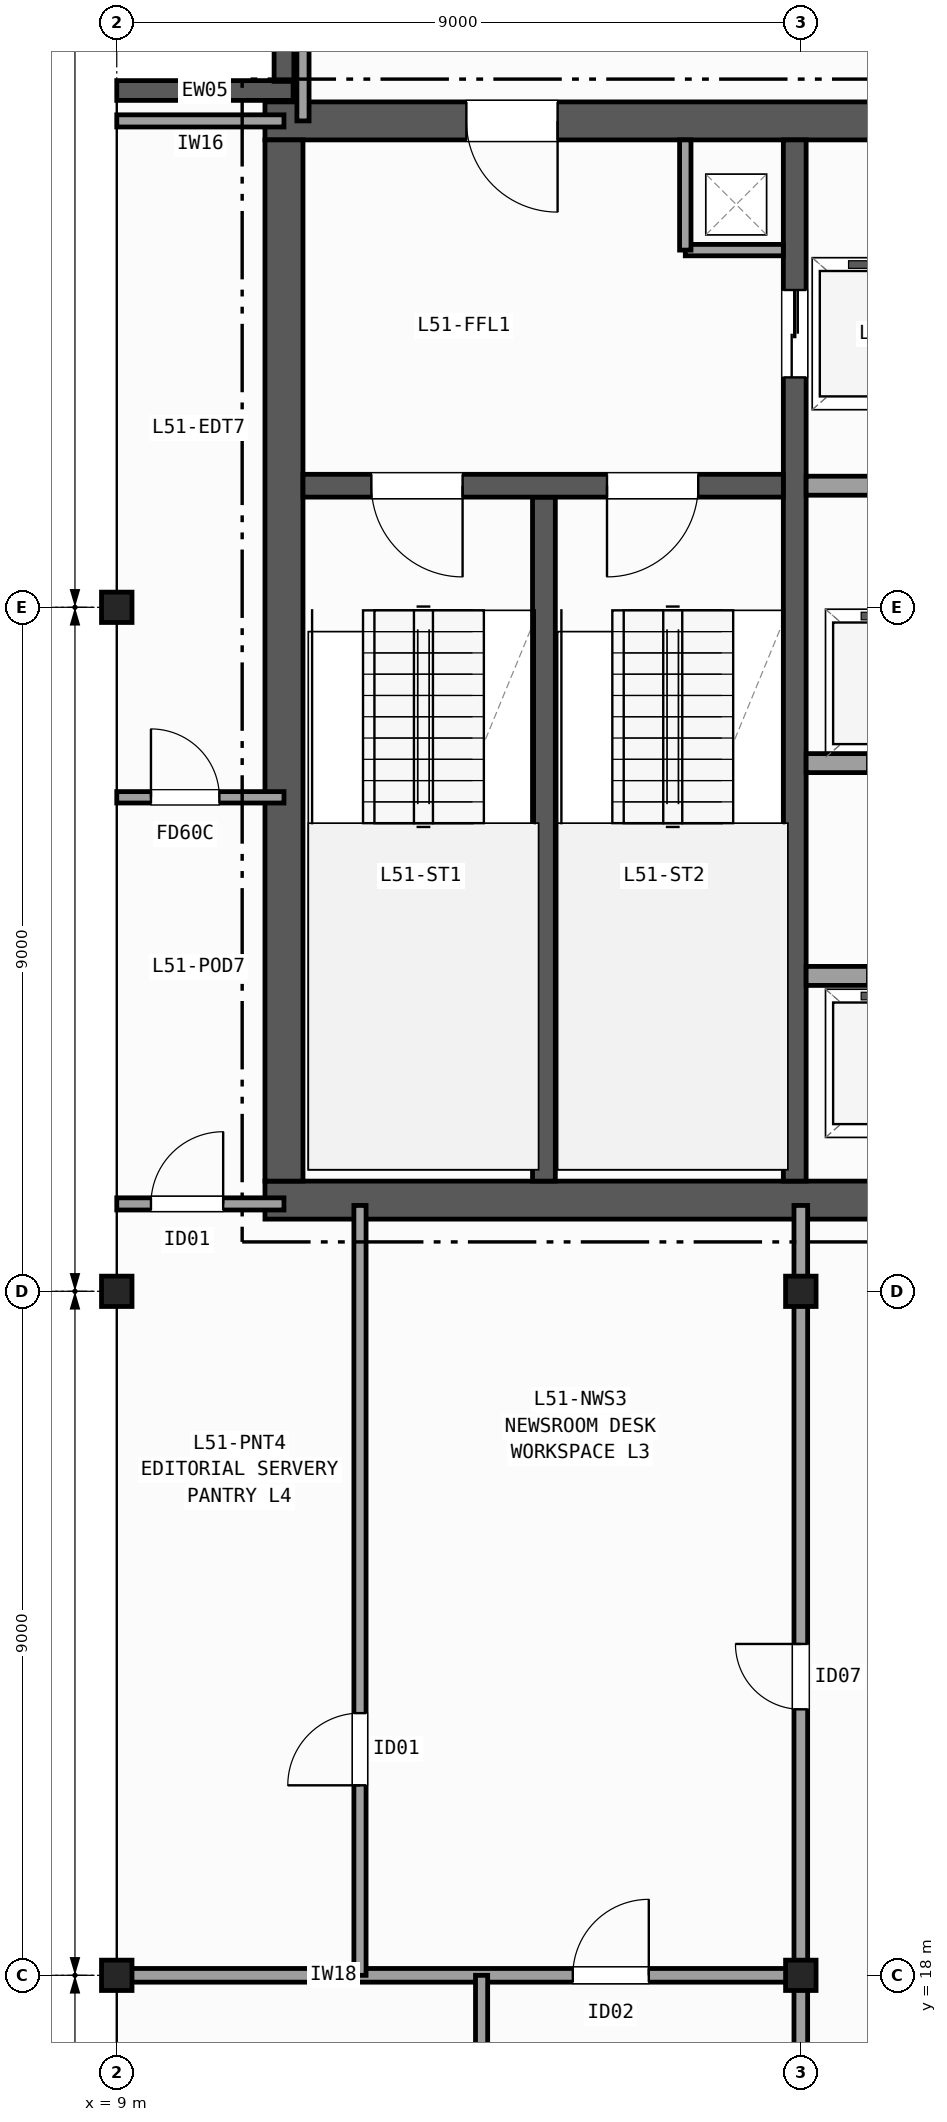
"""IFC4 building model, lengths in metres.
Left out: names, types, materials, properties, quantities, classifications, styles, units other than length and angle.
Written with IfcOpenShell. Run it as: python <this file> out.ifc"""

import sys

from ifc_helpers import new_model, si_unit, direction, frame, frame_2d, origin, origin_2d, place, context, subcontext, project, spatial, rectangle, i_section, extrude, element, fill, save


model = new_model("IFC4")
c1 = context("Model", 3, precision=1e-05, world=origin(), true_north=direction((0.0, 1.0)))
c2 = subcontext(c1, "Body", "Model", "MODEL_VIEW")
j1 = project(units=[si_unit("LENGTHUNIT", "METRE"), si_unit("PLANEANGLEUNIT", "RADIAN")], contexts=[c1])
p1 = place(None, origin())
s1 = spatial("IfcSite", under=j1, at=p1, CompositionType="ELEMENT")
p2 = place(p1, origin())
s2 = spatial("IfcBuilding", under=s1, at=p2, CompositionType="ELEMENT")
p3 = place(p2, frame((0.0, 0.0, 206.2)))
s3 = spatial("IfcBuildingStorey", under=s2, at=p3, CompositionType="ELEMENT", Elevation=206.2)
for number, where, z_axis, x_axis in (
    (1, (9.0, 18.0, 0.0), (0.0, 0.0, 1.0), (1.0, 0.0, 0.0)),
    (2, (9.0, 27.0, 0.0), (0.0, 0.0, 1.0), (1.0, 0.0, 0.0)),
    (3, (9.0, 36.0, 0.0), (0.0, 0.0, 1.0), (1.0, 0.0, 0.0)),
    (4, (18.0, 18.0, 0.0), (0.0, 0.0, 1.0), (1.0, 0.0, 0.0)),
    (5, (18.0, 27.0, 0.0), (0.0, 0.0, 1.0), (1.0, 0.0, 0.0)),
):
    element("IfcColumn", number, at=place(p3, frame(where, z_axis=z_axis, x_axis=x_axis)), inside=s3, PredefinedType="COLUMN", context=c2, shape_type="SweptSolid", body=[
        extrude(i_section(OverallWidth=0.401, OverallDepth=0.399, WebThickness=0.025, FlangeThickness=0.04, FilletRadius=0.015, at=origin_2d()), origin(), (0.0, 0.0, 1.0), 3.7),
    ])
p4 = place(p3, frame((9.0, 42.8, 0.0), z_axis=(0.0, 0.0, 1.0), x_axis=(1.0, 0.0, 0.0)))
e6 = element("IfcWall", 6, at=p4, inside=s3, PredefinedType="SOLIDWALL", context=c2, shape_type="SweptSolid", body=[
    extrude(rectangle(XDim=2.32, YDim=0.26, at=frame_2d((1.16, 0.0))), origin(), (0.0, 0.0, 1.0), 3.42),
])
p5 = place(p3, frame((11.2, 42.92, 0.0), z_axis=(0.0, 0.0, 1.0), x_axis=(0.0, 1.0, 0.0)))
e7 = element("IfcWall", 7, at=p5, inside=s3, PredefinedType="SOLIDWALL", context=c2, shape_type="SweptSolid", body=[
    extrude(rectangle(XDim=2.08, YDim=0.26, at=frame_2d((1.04, 0.0))), origin(), (0.0, 0.0, 1.0), 3.42),
])
p6 = place(p3, frame((10.95, 28.2, 0.0), z_axis=(0.0, 0.0, 1.0), x_axis=(1.0, 0.0, 0.0)))
e8 = element("IfcWall", 8, at=p6, inside=s3, PredefinedType="SHEAR", context=c2, shape_type="SweptSolid", body=[
    extrude(rectangle(XDim=13.9, YDim=0.5, at=frame_2d((6.95, 0.0))), origin(), (0.0, 0.0, 1.0), 3.42),
])
p7 = place(p3, frame((24.85, 42.4, 0.0), z_axis=(0.0, 0.0, 1.0), x_axis=(-1.0, 0.0, 0.0)))
e9 = element("IfcWall", 9, at=p7, inside=s3, PredefinedType="SHEAR", context=c2, shape_type="SweptSolid", body=[
    extrude(rectangle(XDim=13.9, YDim=0.5, at=frame_2d((6.95, 0.0))), origin(), (0.0, 0.0, 1.0), 3.42),
])
p8 = place(p7, frame((10.05, 0.0, 0.0)))
e10 = element("IfcOpeningElement", 10, at=p8, cuts=e9, PredefinedType="OPENING", context=c2, shape_type="SweptSolid", body=[
    extrude(rectangle(XDim=1.2, YDim=2.15, at=frame_2d((0.6, 1.075))), frame((0.0, 0.26, 0.0), z_axis=(0.0, -1.0, 0.0), x_axis=(1.0, 0.0, 0.0)), (0.0, 0.0, 1.0), 0.52),
])
p9 = place(p7, frame((3.0, 0.0, 0.0)))
e11 = element("IfcOpeningElement", 11, at=p9, cuts=e9, PredefinedType="OPENING", context=c2, shape_type="SweptSolid", body=[
    extrude(rectangle(XDim=0.9, YDim=2.1, at=frame_2d((0.45, 1.05))), frame((0.0, 0.26, 0.0), z_axis=(0.0, -1.0, 0.0), x_axis=(1.0, 0.0, 0.0)), (0.0, 0.0, 1.0), 0.52),
])
p10 = place(p3, frame((11.2, 42.15, 0.0), z_axis=(0.0, 0.0, 1.0), x_axis=(0.0, -1.0, 0.0)))
e12 = element("IfcWall", 12, at=p10, inside=s3, PredefinedType="SHEAR", context=c2, shape_type="SweptSolid", body=[
    extrude(rectangle(XDim=13.7, YDim=0.5, at=frame_2d((6.85, 0.0))), origin(), (0.0, 0.0, 1.0), 3.42),
])
p11 = place(p3, frame((14.62, 28.45, 0.0), z_axis=(0.0, 0.0, 1.0), x_axis=(0.0, 1.0, 0.0)))
e13 = element("IfcWall", 13, at=p11, inside=s3, PredefinedType="SHEAR", context=c2, shape_type="SweptSolid", body=[
    extrude(rectangle(XDim=9.0, YDim=0.3, at=frame_2d((4.5, 0.0))), origin(), (0.0, 0.0, 1.0), 3.42),
])
p12 = place(p3, frame((17.92, 42.15, 0.0), z_axis=(0.0, 0.0, 1.0), x_axis=(0.0, -1.0, 0.0)))
e14 = element("IfcWall", 14, at=p12, inside=s3, PredefinedType="SHEAR", context=c2, shape_type="SweptSolid", body=[
    extrude(rectangle(XDim=13.7, YDim=0.3, at=frame_2d((6.85, 0.0))), origin(), (0.0, 0.0, 1.0), 3.42),
])
p13 = place(p12, frame((1.975, 0.0, 0.0)))
e15 = element("IfcOpeningElement", 15, at=p13, cuts=e14, PredefinedType="OPENING", context=c2, shape_type="SweptSolid", body=[
    extrude(rectangle(XDim=1.15, YDim=2.15, at=frame_2d((0.575, 1.075))), frame((0.0, 0.16, 0.0), z_axis=(0.0, -1.0, 0.0), x_axis=(1.0, 0.0, 0.0)), (0.0, 0.0, 1.0), 0.32),
])
p14 = place(p3, frame((17.77, 37.6, 0.0), z_axis=(0.0, 0.0, 1.0), x_axis=(-1.0, 0.0, 0.0)))
e16 = element("IfcWall", 16, at=p14, inside=s3, PredefinedType="SHEAR", context=c2, shape_type="SweptSolid", body=[
    extrude(rectangle(XDim=6.32, YDim=0.3, at=frame_2d((3.16, 0.0))), origin(), (0.0, 0.0, 1.0), 3.42),
])
p15 = place(p14, frame((4.22, 0.0, 0.0)))
e17 = element("IfcOpeningElement", 17, at=p15, cuts=e16, PredefinedType="OPENING", context=c2, shape_type="SweptSolid", body=[
    extrude(rectangle(XDim=1.2, YDim=2.15, at=frame_2d((0.6, 1.075))), frame((0.0, 0.16, 0.0), z_axis=(0.0, -1.0, 0.0), x_axis=(1.0, 0.0, 0.0)), (0.0, 0.0, 1.0), 0.32),
])
p16 = place(p14, frame((1.12, 0.0, 0.0)))
e18 = element("IfcOpeningElement", 18, at=p16, cuts=e16, PredefinedType="OPENING", context=c2, shape_type="SweptSolid", body=[
    extrude(rectangle(XDim=1.2, YDim=2.15, at=frame_2d((0.6, 1.075))), frame((0.0, 0.16, 0.0), z_axis=(0.0, -1.0, 0.0), x_axis=(1.0, 0.0, 0.0)), (0.0, 0.0, 1.0), 0.32),
])
p17 = place(p3, frame((16.48, 40.7, 0.0), z_axis=(0.0, 0.0, 1.0), x_axis=(1.0, 0.0, 0.0)))
e19 = element("IfcWall", 19, at=p17, inside=s3, PredefinedType="PARTITIONING", context=c2, shape_type="SweptSolid", body=[
    extrude(rectangle(XDim=1.29, YDim=0.15, at=frame_2d((0.645, 0.0))), origin(), (0.0, 0.0, 1.0), 3.42),
])
p18 = place(p3, frame((16.48, 40.7, 0.0), z_axis=(0.0, 0.0, 1.0), x_axis=(0.0, 1.0, 0.0)))
e20 = element("IfcWall", 20, at=p18, inside=s3, PredefinedType="PARTITIONING", context=c2, shape_type="SweptSolid", body=[
    extrude(rectangle(XDim=1.45, YDim=0.15, at=frame_2d((0.725, 0.0))), origin(), (0.0, 0.0, 1.0), 3.42),
])
p19 = place(p3, frame((18.07, 37.6, 0.0), z_axis=(0.0, 0.0, 1.0), x_axis=(1.0, 0.0, 0.0)))
e21 = element("IfcWall", 21, at=p19, inside=s3, PredefinedType="PARTITIONING", context=c2, shape_type="SweptSolid", body=[
    extrude(rectangle(XDim=6.28, YDim=0.25, at=frame_2d((3.14, 0.0))), origin(), (0.0, 0.0, 1.0), 3.42),
])
p20 = place(p3, frame((18.07, 31.15, 0.0), z_axis=(0.0, 0.0, 1.0), x_axis=(1.0, 0.0, 0.0)))
e22 = element("IfcWall", 22, at=p20, inside=s3, PredefinedType="PARTITIONING", context=c2, shape_type="SweptSolid", body=[
    extrude(rectangle(XDim=6.28, YDim=0.25, at=frame_2d((3.14, 0.0))), origin(), (0.0, 0.0, 1.0), 3.42),
])
p21 = place(p20, frame((0.805, 0.0, 0.0)))
e23 = element("IfcOpeningElement", 23, at=p21, cuts=e22, PredefinedType="OPENING", context=c2, shape_type="SweptSolid", body=[
    extrude(rectangle(XDim=1.15, YDim=2.15, at=frame_2d((0.575, 1.075))), frame((0.0, 0.135, 0.0), z_axis=(0.0, -1.0, 0.0), x_axis=(1.0, 0.0, 0.0)), (0.0, 0.0, 1.0), 0.27),
])
p22 = place(p20, frame((3.355, 0.0, 0.0)))
e24 = element("IfcOpeningElement", 24, at=p22, cuts=e22, PredefinedType="OPENING", context=c2, shape_type="SweptSolid", body=[
    extrude(rectangle(XDim=1.15, YDim=2.15, at=frame_2d((0.575, 1.075))), frame((0.0, 0.135, 0.0), z_axis=(0.0, -1.0, 0.0), x_axis=(1.0, 0.0, 0.0)), (0.0, 0.0, 1.0), 0.27),
])
p23 = place(p3, frame((24.35, 33.95, 0.0), z_axis=(0.0, 0.0, 1.0), x_axis=(-1.0, 0.0, 0.0)))
e25 = element("IfcWall", 25, at=p23, inside=s3, PredefinedType="PARTITIONING", context=c2, shape_type="SweptSolid", body=[
    extrude(rectangle(XDim=6.28, YDim=0.25, at=frame_2d((3.14, 0.0))), origin(), (0.0, 0.0, 1.0), 3.42),
])
p24 = place(p23, frame((4.325, 0.0, 0.0)))
e26 = element("IfcOpeningElement", 26, at=p24, cuts=e25, PredefinedType="OPENING", context=c2, shape_type="SweptSolid", body=[
    extrude(rectangle(XDim=1.15, YDim=2.15, at=frame_2d((0.575, 1.075))), frame((0.0, 0.135, 0.0), z_axis=(0.0, -1.0, 0.0), x_axis=(1.0, 0.0, 0.0)), (0.0, 0.0, 1.0), 0.27),
])
p25 = place(p23, frame((1.775, 0.0, 0.0)))
e27 = element("IfcOpeningElement", 27, at=p25, cuts=e25, PredefinedType="OPENING", context=c2, shape_type="SweptSolid", body=[
    extrude(rectangle(XDim=1.15, YDim=2.15, at=frame_2d((0.575, 1.075))), frame((0.0, 0.135, 0.0), z_axis=(0.0, -1.0, 0.0), x_axis=(1.0, 0.0, 0.0)), (0.0, 0.0, 1.0), 0.27),
])
p26 = place(p3, frame((9.0, 28.15, 0.0), z_axis=(0.0, 0.0, 1.0), x_axis=(1.0, 0.0, 0.0)))
e28 = element("IfcWall", 28, at=p26, inside=s3, PredefinedType="PARTITIONING", context=c2, shape_type="SweptSolid", body=[
    extrude(rectangle(XDim=2.2, YDim=0.16, at=frame_2d((1.1, 0.0))), origin(), (0.0, 0.0, 1.0), 2.707),
])
p27 = place(p26, frame((0.45, 0.0, 0.0)))
e29 = element("IfcOpeningElement", 29, at=p27, cuts=e28, PredefinedType="OPENING", context=c2, shape_type="SweptSolid", body=[
    extrude(rectangle(XDim=0.95, YDim=2.1, at=frame_2d((0.475, 1.05))), frame((0.0, 0.09, 0.0), z_axis=(0.0, -1.0, 0.0), x_axis=(1.0, 0.0, 0.0)), (0.0, 0.0, 1.0), 0.18),
])
p28 = place(p3, frame((9.0, 42.4, 0.0), z_axis=(0.0, 0.0, 1.0), x_axis=(1.0, 0.0, 0.0)))
e30 = element("IfcWall", 30, at=p28, inside=s3, PredefinedType="PARTITIONING", context=c2, shape_type="SweptSolid", body=[
    extrude(rectangle(XDim=2.2, YDim=0.16, at=frame_2d((1.1, 0.0))), origin(), (0.0, 0.0, 1.0), 3.42),
])
p29 = place(p3, frame((11.45, 42.4, 0.0), z_axis=(0.0, 0.0, 1.0), x_axis=(0.0, 1.0, 0.0)))
e31 = element("IfcWall", 31, at=p29, inside=s3, PredefinedType="PARTITIONING", context=c2, shape_type="SweptSolid", body=[
    extrude(rectangle(XDim=2.666, YDim=0.16, at=frame_2d((1.333, 0.0))), origin(), (0.0, 0.0, 1.0), 3.42),
])
p30 = place(p3, frame((9.0, 33.5, 0.0), z_axis=(0.0, 0.0, 1.0), x_axis=(1.0, 0.0, 0.0)))
e32 = element("IfcWall", 32, at=p30, inside=s3, PredefinedType="PARTITIONING", context=c2, shape_type="SweptSolid", body=[
    extrude(rectangle(XDim=2.2, YDim=0.15, at=frame_2d((1.1, 0.0))), origin(), (0.0, 0.0, 1.0), 2.707),
])
p31 = place(p30, frame((0.45, 0.0, 0.0)))
e33 = element("IfcOpeningElement", 33, at=p31, cuts=e32, PredefinedType="OPENING", context=c2, shape_type="SweptSolid", body=[
    extrude(rectangle(XDim=0.9, YDim=2.1, at=frame_2d((0.45, 1.05))), frame((0.0, 0.085, 0.0), z_axis=(0.0, -1.0, 0.0), x_axis=(1.0, 0.0, 0.0)), (0.0, 0.0, 1.0), 0.17),
])
p32 = place(p3, frame((9.0, 18.0, 0.0), z_axis=(0.0, 0.0, 1.0), x_axis=(1.0, 0.0, 0.0)))
e34 = element("IfcWall", 34, at=p32, inside=s3, PredefinedType="PARTITIONING", context=c2, shape_type="SweptSolid", body=[
    extrude(rectangle(XDim=9.08, YDim=0.18, at=frame_2d((4.54, 0.0))), origin(), (0.0, 0.0, 1.0), 2.707),
])
p33 = place(p32, frame((6.0, 0.0, 0.0)))
e35 = element("IfcOpeningElement", 35, at=p33, cuts=e34, PredefinedType="OPENING", context=c2, shape_type="SweptSolid", body=[
    extrude(rectangle(XDim=1.0, YDim=2.1, at=frame_2d((0.5, 1.05))), frame((0.0, 0.1, 0.0), z_axis=(0.0, -1.0, 0.0), x_axis=(1.0, 0.0, 0.0)), (0.0, 0.0, 1.0), 0.2),
])
p34 = place(p3, frame((18.0, 14.2, 0.0), z_axis=(0.0, 0.0, 1.0), x_axis=(0.0, 1.0, 0.0)))
e36 = element("IfcWall", 36, at=p34, inside=s3, PredefinedType="PARTITIONING", context=c2, shape_type="SweptSolid", body=[
    extrude(rectangle(XDim=13.93, YDim=0.18, at=frame_2d((6.965, 0.0))), origin(), (0.0, 0.0, 1.0), 2.789),
])
p35 = place(p34, frame((7.3, 0.0, 0.0)))
e37 = element("IfcOpeningElement", 37, at=p35, cuts=e36, PredefinedType="OPENING", context=c2, shape_type="SweptSolid", body=[
    extrude(rectangle(XDim=0.86, YDim=2.05, at=frame_2d((0.43, 1.025))), frame((0.0, 0.1, 0.0), z_axis=(0.0, -1.0, 0.0), x_axis=(1.0, 0.0, 0.0)), (0.0, 0.0, 1.0), 0.2),
])
p36 = place(p3, frame((12.2, 18.0, 0.0), z_axis=(0.0, 0.0, 1.0), x_axis=(0.0, 1.0, 0.0)))
e38 = element("IfcWall", 38, at=p36, inside=s3, PredefinedType="PARTITIONING", context=c2, shape_type="SweptSolid", body=[
    extrude(rectangle(XDim=10.13, YDim=0.16, at=frame_2d((5.065, 0.0))), origin(), (0.0, 0.0, 1.0), 2.789),
])
p37 = place(p36, frame((2.5, 0.0, 0.0)))
e39 = element("IfcOpeningElement", 39, at=p37, cuts=e38, PredefinedType="OPENING", context=c2, shape_type="SweptSolid", body=[
    extrude(rectangle(XDim=0.95, YDim=2.1, at=frame_2d((0.475, 1.05))), frame((0.0, 0.09, 0.0), z_axis=(0.0, -1.0, 0.0), x_axis=(1.0, 0.0, 0.0)), (0.0, 0.0, 1.0), 0.18),
])
p38 = place(p3, frame((13.8, 8.165, 0.0), z_axis=(0.0, 0.0, 1.0), x_axis=(0.0, 1.0, 0.0)))
e40 = element("IfcWall", 40, at=p38, inside=s3, PredefinedType="PARTITIONING", context=c2, shape_type="SweptSolid", body=[
    extrude(rectangle(XDim=9.835, YDim=0.16, at=frame_2d((4.917, 0.0))), origin(), (0.0, 0.0, 1.0), 2.789),
])
p39 = place(p38, frame((3.335, 0.0, 0.0)))
e41 = element("IfcOpeningElement", 41, at=p39, cuts=e40, PredefinedType="OPENING", context=c2, shape_type="SweptSolid", body=[
    extrude(rectangle(XDim=1.05, YDim=2.15, at=frame_2d((0.525, 1.075))), frame((0.0, 0.09, 0.0), z_axis=(0.0, -1.0, 0.0), x_axis=(1.0, 0.0, 0.0)), (0.0, 0.0, 1.0), 0.18),
])
p40 = place(p15, origin())
e42 = element("IfcDoor", 42, at=p40, inside=s3, OperationType="SINGLE_SWING_LEFT", PredefinedType="DOOR", context=c2, shape_type="SweptSolid", body=[
    extrude(rectangle(XDim=1.2, YDim=2.15, at=frame_2d((0.6, 1.075))), frame((0.0, 0.025, 0.0), z_axis=(0.0, -1.0, 0.0), x_axis=(1.0, 0.0, 0.0)), (0.0, 0.0, 1.0), 0.05),
])
fill(e17, e42)
p41 = place(p16, origin())
e43 = element("IfcDoor", 43, at=p41, inside=s3, OperationType="SINGLE_SWING_RIGHT", PredefinedType="DOOR", context=c2, shape_type="SweptSolid", body=[
    extrude(rectangle(XDim=1.2, YDim=2.15, at=frame_2d((0.6, 1.075))), frame((0.0, 0.025, 0.0), z_axis=(0.0, -1.0, 0.0), x_axis=(1.0, 0.0, 0.0)), (0.0, 0.0, 1.0), 0.05),
])
fill(e18, e43)
p42 = place(p8, origin())
e44 = element("IfcDoor", 44, at=p42, inside=s3, OperationType="SINGLE_SWING_LEFT", PredefinedType="DOOR", context=c2, shape_type="SweptSolid", body=[
    extrude(rectangle(XDim=1.2, YDim=2.15, at=frame_2d((0.6, 1.075))), frame((0.0, 0.025, 0.0), z_axis=(0.0, -1.0, 0.0), x_axis=(1.0, 0.0, 0.0)), (0.0, 0.0, 1.0), 0.05),
])
fill(e10, e44)
p43 = place(p13, origin())
e45 = element("IfcDoor", 45, at=p43, inside=s3, OperationType="DOUBLE_DOOR_SLIDING", PredefinedType="DOOR", context=c2, shape_type="SweptSolid", body=[
    extrude(rectangle(XDim=1.15, YDim=2.15, at=frame_2d((0.575, 1.075))), frame((0.0, 0.025, 0.0), z_axis=(0.0, -1.0, 0.0), x_axis=(1.0, 0.0, 0.0)), (0.0, 0.0, 1.0), 0.05),
])
fill(e15, e45)
p44 = place(p21, origin())
e46 = element("IfcDoor", 46, at=p44, inside=s3, OperationType="DOUBLE_DOOR_SLIDING", PredefinedType="DOOR", context=c2, shape_type="SweptSolid", body=[
    extrude(rectangle(XDim=1.15, YDim=2.15, at=frame_2d((0.575, 1.075))), frame((0.0, 0.025, 0.0), z_axis=(0.0, -1.0, 0.0), x_axis=(1.0, 0.0, 0.0)), (0.0, 0.0, 1.0), 0.05),
])
fill(e23, e46)
p45 = place(p24, origin())
e47 = element("IfcDoor", 47, at=p45, inside=s3, OperationType="DOUBLE_DOOR_SLIDING", PredefinedType="DOOR", context=c2, shape_type="SweptSolid", body=[
    extrude(rectangle(XDim=1.15, YDim=2.15, at=frame_2d((0.575, 1.075))), frame((0.0, 0.025, 0.0), z_axis=(0.0, -1.0, 0.0), x_axis=(1.0, 0.0, 0.0)), (0.0, 0.0, 1.0), 0.05),
])
fill(e26, e47)
p46 = place(p27, origin())
e48 = element("IfcDoor", 48, at=p46, inside=s3, OperationType="SINGLE_SWING_RIGHT", PredefinedType="DOOR", context=c2, shape_type="SweptSolid", body=[
    extrude(rectangle(XDim=0.95, YDim=2.1, at=frame_2d((0.475, 1.05))), frame((0.0, 0.025, 0.0), z_axis=(0.0, -1.0, 0.0), x_axis=(1.0, 0.0, 0.0)), (0.0, 0.0, 1.0), 0.05),
])
fill(e29, e48)
p47 = place(p31, origin())
e49 = element("IfcDoor", 49, at=p47, inside=s3, OperationType="SINGLE_SWING_LEFT", PredefinedType="DOOR", context=c2, shape_type="SweptSolid", body=[
    extrude(rectangle(XDim=0.9, YDim=2.1, at=frame_2d((0.45, 1.05))), frame((0.0, 0.025, 0.0), z_axis=(0.0, -1.0, 0.0), x_axis=(1.0, 0.0, 0.0)), (0.0, 0.0, 1.0), 0.05),
])
fill(e33, e49)
p48 = place(p35, origin())
e50 = element("IfcDoor", 50, at=p48, inside=s3, OperationType="SINGLE_SWING_RIGHT", PredefinedType="DOOR", context=c2, shape_type="SweptSolid", body=[
    extrude(rectangle(XDim=0.86, YDim=2.05, at=frame_2d((0.43, 1.025))), frame((0.0, 0.025, 0.0), z_axis=(0.0, -1.0, 0.0), x_axis=(1.0, 0.0, 0.0)), (0.0, 0.0, 1.0), 0.05),
])
fill(e37, e50)
p49 = place(p37, origin())
e51 = element("IfcDoor", 51, at=p49, inside=s3, OperationType="SINGLE_SWING_LEFT", PredefinedType="DOOR", context=c2, shape_type="SweptSolid", body=[
    extrude(rectangle(XDim=0.95, YDim=2.1, at=frame_2d((0.475, 1.05))), frame((0.0, 0.025, 0.0), z_axis=(0.0, -1.0, 0.0), x_axis=(1.0, 0.0, 0.0)), (0.0, 0.0, 1.0), 0.05),
])
fill(e39, e51)
p50 = place(p33, origin())
e52 = element("IfcDoor", 52, at=p50, inside=s3, OperationType="SINGLE_SWING_RIGHT", PredefinedType="DOOR", context=c2, shape_type="SweptSolid", body=[
    extrude(rectangle(XDim=1.0, YDim=2.1, at=frame_2d((0.5, 1.05))), frame((0.0, 0.025, 0.0), z_axis=(0.0, -1.0, 0.0), x_axis=(1.0, 0.0, 0.0)), (0.0, 0.0, 1.0), 0.05),
])
fill(e35, e52)
save(model, sys.argv[1])
